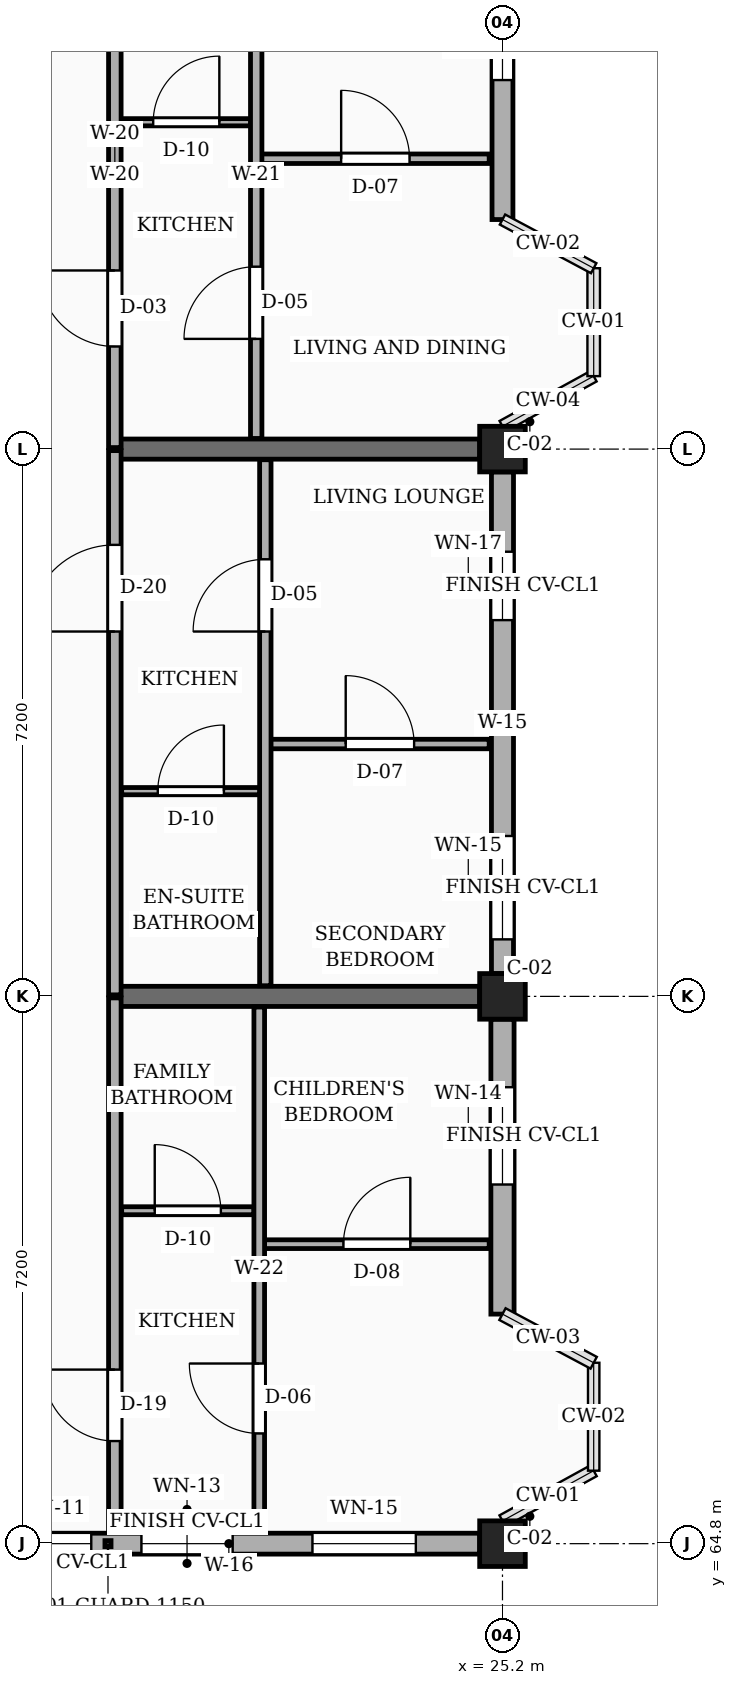
"""IFC4 building model, lengths in metres.
Left out: names, types, materials, properties, quantities, classifications, styles, units other than length and angle.
Written with IfcOpenShell. Run it as: python <this file> out.ifc"""

import sys

from ifc_helpers import new_model, si_unit, direction, frame, frame_2d, origin, origin_2d, place, context, subcontext, project, spatial, rectangle, extrude, element, fill, save


model = new_model("IFC4")
c1 = context("Model", 3, precision=1e-05, world=origin(), true_north=direction((0.0, 1.0)))
c2 = subcontext(c1, "Body", "Model", "MODEL_VIEW")
j1 = project(units=[si_unit("LENGTHUNIT", "METRE"), si_unit("PLANEANGLEUNIT", "RADIAN")], contexts=[c1])
p1 = place(None, origin())
s1 = spatial("IfcSite", under=j1, at=p1, CompositionType="ELEMENT")
p2 = place(p1, origin())
s2 = spatial("IfcBuilding", under=s1, at=p2, CompositionType="ELEMENT")
p3 = place(p2, frame((0.0, 0.0, 7.65)))
s3 = spatial("IfcBuildingStorey", under=s2, at=p3, CompositionType="ELEMENT", Elevation=7.65)
for number, where, z_axis, x_axis in (
    (1, (25.2, 64.8, 0.0), (0.0, 0.0, 1.0), (1.0, 0.0, 0.0)),
    (2, (25.2, 72.0, 0.0), (0.0, 0.0, 1.0), (1.0, 0.0, 0.0)),
    (3, (25.2, 79.2, 0.0), (0.0, 0.0, 1.0), (1.0, 0.0, 0.0)),
):
    element("IfcColumn", number, at=place(p3, frame(where, z_axis=z_axis, x_axis=x_axis)), inside=s3, PredefinedType="COLUMN", context=c2, shape_type="SweptSolid", body=[
        extrude(rectangle(XDim=0.6, YDim=0.6, at=origin_2d()), origin(), (0.0, 0.0, 1.0), 3.15),
    ])
for number, where, z_axis, x_axis in (
    (4, (20.1, 72.0, 0.0), (0.0, 0.0, 1.0), (1.0, 0.0, 0.0)),
    (5, (20.1, 79.2, 0.0), (0.0, 0.0, 1.0), (1.0, 0.0, 0.0)),
):
    element("IfcWall", number, at=place(p3, frame(where, z_axis=z_axis, x_axis=x_axis)), inside=s3, PredefinedType="SOLIDWALL", context=c2, shape_type="SweptSolid", body=[
        extrude(rectangle(XDim=4.8, YDim=0.265, at=frame_2d((2.4, 0.0))), origin(), (0.0, 0.0, 1.0), 2.21),
    ])
p4 = place(p3, frame((18.3, 64.8, 0.0), z_axis=(0.0, 0.0, 1.0), x_axis=(1.0, 0.0, 0.0)))
e6 = element("IfcWall", 6, at=p4, inside=s3, PredefinedType="SOLIDWALL", context=c2, shape_type="SweptSolid", body=[
    extrude(rectangle(XDim=6.6, YDim=0.275, at=frame_2d((3.3, 0.0))), origin(), (0.0, 0.0, 1.0), 2.48),
])
p5 = place(p4, frame((0.45, 0.0, 0.78)))
e7 = element("IfcOpeningElement", 7, at=p5, cuts=e6, PredefinedType="OPENING", context=c2, shape_type="SweptSolid", body=[
    extrude(rectangle(XDim=1.04, YDim=1.26, at=frame_2d((0.52, 0.63))), frame((0.0, 0.147, 0.0), z_axis=(0.0, -1.0, 0.0), x_axis=(1.0, 0.0, 0.0)), (0.0, 0.0, 1.0), 0.295),
])
p6 = place(p4, frame((2.15, 0.0, 0.78)))
e8 = element("IfcOpeningElement", 8, at=p6, cuts=e6, PredefinedType="OPENING", context=c2, shape_type="SweptSolid", body=[
    extrude(rectangle(XDim=1.2, YDim=1.26, at=frame_2d((0.6, 0.63))), frame((0.0, 0.147, 0.0), z_axis=(0.0, -1.0, 0.0), x_axis=(1.0, 0.0, 0.0)), (0.0, 0.0, 1.0), 0.295),
])
p7 = place(p4, frame((4.4, 0.0, 0.78)))
e9 = element("IfcOpeningElement", 9, at=p7, cuts=e6, PredefinedType="OPENING", context=c2, shape_type="SweptSolid", body=[
    extrude(rectangle(XDim=1.36, YDim=1.26, at=frame_2d((0.68, 0.63))), frame((0.0, 0.147, 0.0), z_axis=(0.0, -1.0, 0.0), x_axis=(1.0, 0.0, 0.0)), (0.0, 0.0, 1.0), 0.295),
])
p8 = place(p3, frame((25.2, 67.82, 0.0), z_axis=(0.0, 0.0, 1.0), x_axis=(0.0, 1.0, 0.0)))
e10 = element("IfcWall", 10, at=p8, inside=s3, PredefinedType="SOLIDWALL", context=c2, shape_type="SweptSolid", body=[
    extrude(rectangle(XDim=3.88, YDim=0.305, at=frame_2d((1.94, 0.0))), origin(), (0.0, 0.0, 1.0), 2.48),
])
p9 = place(p8, frame((1.705, 0.0, 0.78)))
e11 = element("IfcOpeningElement", 11, at=p9, cuts=e10, PredefinedType="OPENING", context=c2, shape_type="SweptSolid", body=[
    extrude(rectangle(XDim=1.28, YDim=1.26, at=frame_2d((0.64, 0.63))), frame((0.0, 0.163, 0.0), z_axis=(0.0, -1.0, 0.0), x_axis=(1.0, 0.0, 0.0)), (0.0, 0.0, 1.0), 0.325),
])
p10 = place(p3, frame((25.2, 72.3, 0.0), z_axis=(0.0, 0.0, 1.0), x_axis=(0.0, 1.0, 0.0)))
e12 = element("IfcWall", 12, at=p10, inside=s3, PredefinedType="SOLIDWALL", context=c2, shape_type="SweptSolid", body=[
    extrude(rectangle(XDim=6.6, YDim=0.29, at=frame_2d((3.3, 0.0))), origin(), (0.0, 0.0, 1.0), 2.48),
])
p11 = place(p10, frame((0.45, 0.0, 0.78)))
e13 = element("IfcOpeningElement", 13, at=p11, cuts=e12, PredefinedType="OPENING", context=c2, shape_type="SweptSolid", body=[
    extrude(rectangle(XDim=1.36, YDim=1.26, at=frame_2d((0.68, 0.63))), frame((0.0, 0.155, 0.0), z_axis=(0.0, -1.0, 0.0), x_axis=(1.0, 0.0, 0.0)), (0.0, 0.0, 1.0), 0.31),
])
p12 = place(p10, frame((4.65, 0.0, 0.78)))
e14 = element("IfcOpeningElement", 14, at=p12, cuts=e12, PredefinedType="OPENING", context=c2, shape_type="SweptSolid", body=[
    extrude(rectangle(XDim=0.9, YDim=1.36, at=frame_2d((0.45, 0.68))), frame((0.0, 0.155, 0.0), z_axis=(0.0, -1.0, 0.0), x_axis=(1.0, 0.0, 0.0)), (0.0, 0.0, 1.0), 0.31),
])
p13 = place(p3, frame((25.2, 82.22, 0.0), z_axis=(0.0, 0.0, 1.0), x_axis=(0.0, 1.0, 0.0)))
e15 = element("IfcWall", 15, at=p13, inside=s3, PredefinedType="SOLIDWALL", context=c2, shape_type="SweptSolid", body=[
    extrude(rectangle(XDim=3.88, YDim=0.275, at=frame_2d((1.94, 0.0))), origin(), (0.0, 0.0, 1.0), 2.48),
])
p14 = place(p13, frame((1.835, 0.0, 0.78)))
e16 = element("IfcOpeningElement", 16, at=p14, cuts=e15, PredefinedType="OPENING", context=c2, shape_type="SweptSolid", body=[
    extrude(rectangle(XDim=0.9, YDim=1.36, at=frame_2d((0.45, 0.68))), frame((0.0, 0.147, 0.0), z_axis=(0.0, -1.0, 0.0), x_axis=(1.0, 0.0, 0.0)), (0.0, 0.0, 1.0), 0.295),
])
p15 = place(p3, frame((20.1, 64.975, 0.0), z_axis=(0.0, 0.0, 1.0), x_axis=(0.0, 1.0, 0.0)))
e17 = element("IfcWall", 17, at=p15, inside=s3, PredefinedType="PARTITIONING", context=c2, shape_type="SweptSolid", body=[
    extrude(rectangle(XDim=7.005, YDim=0.165, at=frame_2d((3.502, 0.0))), origin(), (0.0, 0.0, 1.0), 2.345),
])
p16 = place(p15, frame((1.175, 0.0, 0.0)))
e18 = element("IfcOpeningElement", 18, at=p16, cuts=e17, PredefinedType="OPENING", context=c2, shape_type="SweptSolid", body=[
    extrude(rectangle(XDim=0.94, YDim=2.12, at=frame_2d((0.47, 1.06))), frame((0.0, 0.093, 0.0), z_axis=(0.0, -1.0, 0.0), x_axis=(1.0, 0.0, 0.0)), (0.0, 0.0, 1.0), 0.185),
])
p17 = place(p3, frame((20.1, 72.02, 0.0), z_axis=(0.0, 0.0, 1.0), x_axis=(0.0, 1.0, 0.0)))
e19 = element("IfcWall", 19, at=p17, inside=s3, PredefinedType="PARTITIONING", context=c2, shape_type="SweptSolid", body=[
    extrude(rectangle(XDim=7.16, YDim=0.165, at=frame_2d((3.58, 0.0))), origin(), (0.0, 0.0, 1.0), 2.345),
])
p18 = place(p17, frame((4.78, 0.0, 0.0)))
e20 = element("IfcOpeningElement", 20, at=p18, cuts=e19, PredefinedType="OPENING", context=c2, shape_type="SweptSolid", body=[
    extrude(rectangle(XDim=1.14, YDim=2.18, at=frame_2d((0.57, 1.09))), frame((0.0, 0.093, 0.0), z_axis=(0.0, -1.0, 0.0), x_axis=(1.0, 0.0, 0.0)), (0.0, 0.0, 1.0), 0.185),
])
p19 = place(p3, frame((20.1, 79.22, 0.0), z_axis=(0.0, 0.0, 1.0), x_axis=(0.0, 1.0, 0.0)))
e21 = element("IfcWall", 21, at=p19, inside=s3, PredefinedType="PARTITIONING", context=c2, shape_type="SweptSolid", body=[
    extrude(rectangle(XDim=7.16, YDim=0.165, at=frame_2d((3.58, 0.0))), origin(), (0.0, 0.0, 1.0), 2.345),
])
p20 = place(p19, frame((1.33, 0.0, 0.0)))
e22 = element("IfcOpeningElement", 22, at=p20, cuts=e21, PredefinedType="OPENING", context=c2, shape_type="SweptSolid", body=[
    extrude(rectangle(XDim=1.0, YDim=2.15, at=frame_2d((0.5, 1.075))), frame((0.0, 0.093, 0.0), z_axis=(0.0, -1.0, 0.0), x_axis=(1.0, 0.0, 0.0)), (0.0, 0.0, 1.0), 0.185),
])
p21 = place(p3, frame((22.07, 68.74, 0.0), z_axis=(0.0, 0.0, 1.0), x_axis=(1.0, 0.0, 0.0)))
e23 = element("IfcWall", 23, at=p21, inside=s3, PredefinedType="PARTITIONING", context=c2, shape_type="SweptSolid", body=[
    extrude(rectangle(XDim=2.955, YDim=0.115, at=frame_2d((1.478, 0.0))), origin(), (0.0, 0.0, 1.0), 2.345),
])
p22 = place(p21, frame((1.038, 0.0, 0.0)))
e24 = element("IfcOpeningElement", 24, at=p22, cuts=e23, PredefinedType="OPENING", context=c2, shape_type="SweptSolid", body=[
    extrude(rectangle(XDim=0.88, YDim=2.08, at=frame_2d((0.44, 1.04))), frame((0.0, 0.067, 0.0), z_axis=(0.0, -1.0, 0.0), x_axis=(1.0, 0.0, 0.0)), (0.0, 0.0, 1.0), 0.135),
])
p23 = place(p3, frame((20.19, 69.18, 0.0), z_axis=(0.0, 0.0, 1.0), x_axis=(1.0, 0.0, 0.0)))
e25 = element("IfcWall", 25, at=p23, inside=s3, PredefinedType="PARTITIONING", context=c2, shape_type="SweptSolid", body=[
    extrude(rectangle(XDim=1.74, YDim=0.105, at=frame_2d((0.87, 0.0))), origin(), (0.0, 0.0, 1.0), 2.345),
])
p24 = place(p23, frame((0.435, 0.0, 0.0)))
e26 = element("IfcOpeningElement", 26, at=p24, cuts=e25, PredefinedType="OPENING", context=c2, shape_type="SweptSolid", body=[
    extrude(rectangle(XDim=0.87, YDim=2.05, at=frame_2d((0.435, 1.025))), frame((0.0, 0.062, 0.0), z_axis=(0.0, -1.0, 0.0), x_axis=(1.0, 0.0, 0.0)), (0.0, 0.0, 1.0), 0.125),
])
p25 = place(p3, frame((22.0, 64.975, 0.0), z_axis=(0.0, 0.0, 1.0), x_axis=(0.0, 1.0, 0.0)))
e27 = element("IfcWall", 27, at=p25, inside=s3, PredefinedType="PARTITIONING", context=c2, shape_type="SweptSolid", body=[
    extrude(rectangle(XDim=6.885, YDim=0.14, at=frame_2d((3.442, 0.0))), origin(), (0.0, 0.0, 1.0), 2.345),
])
p26 = place(p25, frame((1.275, 0.0, 0.0)))
e28 = element("IfcOpeningElement", 28, at=p26, cuts=e27, PredefinedType="OPENING", context=c2, shape_type="SweptSolid", body=[
    extrude(rectangle(XDim=0.92, YDim=2.1, at=frame_2d((0.46, 1.05))), frame((0.0, 0.08, 0.0), z_axis=(0.0, -1.0, 0.0), x_axis=(1.0, 0.0, 0.0)), (0.0, 0.0, 1.0), 0.16),
])
p27 = place(p3, frame((22.15, 75.32, 0.0), z_axis=(0.0, 0.0, 1.0), x_axis=(1.0, 0.0, 0.0)))
e29 = element("IfcWall", 29, at=p27, inside=s3, PredefinedType="PARTITIONING", context=c2, shape_type="SweptSolid", body=[
    extrude(rectangle(XDim=2.875, YDim=0.125, at=frame_2d((1.438, 0.0))), origin(), (0.0, 0.0, 1.0), 2.345),
])
p28 = place(p27, frame((0.988, 0.0, 0.0)))
e30 = element("IfcOpeningElement", 30, at=p28, cuts=e29, PredefinedType="OPENING", context=c2, shape_type="SweptSolid", body=[
    extrude(rectangle(XDim=0.9, YDim=2.1, at=frame_2d((0.45, 1.05))), frame((0.0, 0.073, 0.0), z_axis=(0.0, -1.0, 0.0), x_axis=(1.0, 0.0, 0.0)), (0.0, 0.0, 1.0), 0.145),
])
p29 = place(p3, frame((20.19, 74.7, 0.0), z_axis=(0.0, 0.0, 1.0), x_axis=(1.0, 0.0, 0.0)))
e31 = element("IfcWall", 31, at=p29, inside=s3, PredefinedType="PARTITIONING", context=c2, shape_type="SweptSolid", body=[
    extrude(rectangle(XDim=1.82, YDim=0.095, at=frame_2d((0.91, 0.0))), origin(), (0.0, 0.0, 1.0), 2.345),
])
p30 = place(p29, frame((0.475, 0.0, 0.0)))
e32 = element("IfcOpeningElement", 32, at=p30, cuts=e31, PredefinedType="OPENING", context=c2, shape_type="SweptSolid", body=[
    extrude(rectangle(XDim=0.87, YDim=2.05, at=frame_2d((0.435, 1.025))), frame((0.0, 0.058, 0.0), z_axis=(0.0, -1.0, 0.0), x_axis=(1.0, 0.0, 0.0)), (0.0, 0.0, 1.0), 0.115),
])
p31 = place(p3, frame((22.08, 72.14, 0.0), z_axis=(0.0, 0.0, 1.0), x_axis=(0.0, 1.0, 0.0)))
e33 = element("IfcWall", 33, at=p31, inside=s3, PredefinedType="PARTITIONING", context=c2, shape_type="SweptSolid", body=[
    extrude(rectangle(XDim=6.92, YDim=0.15, at=frame_2d((3.46, 0.0))), origin(), (0.0, 0.0, 1.0), 2.345),
])
p32 = place(p31, frame((4.66, 0.0, 0.0)))
e34 = element("IfcOpeningElement", 34, at=p32, cuts=e33, PredefinedType="OPENING", context=c2, shape_type="SweptSolid", body=[
    extrude(rectangle(XDim=0.95, YDim=2.1, at=frame_2d((0.475, 1.05))), frame((0.0, 0.085, 0.0), z_axis=(0.0, -1.0, 0.0), x_axis=(1.0, 0.0, 0.0)), (0.0, 0.0, 1.0), 0.17),
])
p33 = place(p3, frame((22.03, 83.02, 0.0), z_axis=(0.0, 0.0, 1.0), x_axis=(1.0, 0.0, 0.0)))
e35 = element("IfcWall", 35, at=p33, inside=s3, PredefinedType="PARTITIONING", context=c2, shape_type="SweptSolid", body=[
    extrude(rectangle(XDim=2.995, YDim=0.125, at=frame_2d((1.498, 0.0))), origin(), (0.0, 0.0, 1.0), 2.345),
])
p34 = place(p33, frame((1.048, 0.0, 0.0)))
e36 = element("IfcOpeningElement", 36, at=p34, cuts=e35, PredefinedType="OPENING", context=c2, shape_type="SweptSolid", body=[
    extrude(rectangle(XDim=0.9, YDim=2.1, at=frame_2d((0.45, 1.05))), frame((0.0, 0.073, 0.0), z_axis=(0.0, -1.0, 0.0), x_axis=(1.0, 0.0, 0.0)), (0.0, 0.0, 1.0), 0.145),
])
p35 = place(p3, frame((20.19, 83.5, 0.0), z_axis=(0.0, 0.0, 1.0), x_axis=(1.0, 0.0, 0.0)))
e37 = element("IfcWall", 37, at=p35, inside=s3, PredefinedType="PARTITIONING", context=c2, shape_type="SweptSolid", body=[
    extrude(rectangle(XDim=1.7, YDim=0.095, at=frame_2d((0.85, 0.0))), origin(), (0.0, 0.0, 1.0), 2.345),
])
p36 = place(p35, frame((0.415, 0.0, 0.0)))
e38 = element("IfcOpeningElement", 38, at=p36, cuts=e37, PredefinedType="OPENING", context=c2, shape_type="SweptSolid", body=[
    extrude(rectangle(XDim=0.87, YDim=2.05, at=frame_2d((0.435, 1.025))), frame((0.0, 0.058, 0.0), z_axis=(0.0, -1.0, 0.0), x_axis=(1.0, 0.0, 0.0)), (0.0, 0.0, 1.0), 0.115),
])
p37 = place(p3, frame((21.96, 79.34, 0.0), z_axis=(0.0, 0.0, 1.0), x_axis=(0.0, 1.0, 0.0)))
e39 = element("IfcWall", 39, at=p37, inside=s3, PredefinedType="PARTITIONING", context=c2, shape_type="SweptSolid", body=[
    extrude(rectangle(XDim=6.92, YDim=0.15, at=frame_2d((3.46, 0.0))), origin(), (0.0, 0.0, 1.0), 2.345),
])
p38 = place(p37, frame((1.31, 0.0, 0.0)))
e40 = element("IfcOpeningElement", 40, at=p38, cuts=e39, PredefinedType="OPENING", context=c2, shape_type="SweptSolid", body=[
    extrude(rectangle(XDim=0.95, YDim=2.1, at=frame_2d((0.475, 1.05))), frame((0.0, 0.085, 0.0), z_axis=(0.0, -1.0, 0.0), x_axis=(1.0, 0.0, 0.0)), (0.0, 0.0, 1.0), 0.17),
])
p39 = place(p5, origin())
e41 = element("IfcWindow", 41, at=p39, inside=s3, PartitioningType="SINGLE_PANEL", PredefinedType="WINDOW", context=c2, shape_type="SweptSolid", body=[
    extrude(rectangle(XDim=1.04, YDim=1.26, at=frame_2d((0.52, 0.63))), frame((0.0, 0.03, 0.0), z_axis=(0.0, -1.0, 0.0), x_axis=(1.0, 0.0, 0.0)), (0.0, 0.0, 1.0), 0.06),
])
fill(e7, e41)
p40 = place(p6, origin())
e42 = element("IfcWindow", 42, at=p40, inside=s3, PartitioningType="SINGLE_PANEL", PredefinedType="WINDOW", context=c2, shape_type="SweptSolid", body=[
    extrude(rectangle(XDim=1.2, YDim=1.26, at=frame_2d((0.6, 0.63))), frame((0.0, 0.03, 0.0), z_axis=(0.0, -1.0, 0.0), x_axis=(1.0, 0.0, 0.0)), (0.0, 0.0, 1.0), 0.06),
])
fill(e8, e42)
p41 = place(p7, origin())
e43 = element("IfcWindow", 43, at=p41, inside=s3, PartitioningType="SINGLE_PANEL", PredefinedType="WINDOW", context=c2, shape_type="SweptSolid", body=[
    extrude(rectangle(XDim=1.36, YDim=1.26, at=frame_2d((0.68, 0.63))), frame((0.0, 0.03, 0.0), z_axis=(0.0, -1.0, 0.0), x_axis=(1.0, 0.0, 0.0)), (0.0, 0.0, 1.0), 0.06),
])
fill(e9, e43)
p42 = place(p9, origin())
e44 = element("IfcWindow", 44, at=p42, inside=s3, PartitioningType="SINGLE_PANEL", PredefinedType="WINDOW", context=c2, shape_type="SweptSolid", body=[
    extrude(rectangle(XDim=1.28, YDim=1.26, at=frame_2d((0.64, 0.63))), frame((0.0, 0.03, 0.0), z_axis=(0.0, -1.0, 0.0), x_axis=(1.0, 0.0, 0.0)), (0.0, 0.0, 1.0), 0.06),
])
fill(e11, e44)
p43 = place(p11, origin())
e45 = element("IfcWindow", 45, at=p43, inside=s3, PartitioningType="SINGLE_PANEL", PredefinedType="WINDOW", context=c2, shape_type="SweptSolid", body=[
    extrude(rectangle(XDim=1.36, YDim=1.26, at=frame_2d((0.68, 0.63))), frame((0.0, 0.03, 0.0), z_axis=(0.0, -1.0, 0.0), x_axis=(1.0, 0.0, 0.0)), (0.0, 0.0, 1.0), 0.06),
])
fill(e13, e45)
p44 = place(p12, origin())
e46 = element("IfcWindow", 46, at=p44, inside=s3, PartitioningType="SINGLE_PANEL", PredefinedType="WINDOW", context=c2, shape_type="SweptSolid", body=[
    extrude(rectangle(XDim=0.9, YDim=1.36, at=frame_2d((0.45, 0.68))), frame((0.0, 0.03, 0.0), z_axis=(0.0, -1.0, 0.0), x_axis=(1.0, 0.0, 0.0)), (0.0, 0.0, 1.0), 0.06),
])
fill(e14, e46)
p45 = place(p14, origin())
e47 = element("IfcWindow", 47, at=p45, inside=s3, PartitioningType="SINGLE_PANEL", PredefinedType="WINDOW", context=c2, shape_type="SweptSolid", body=[
    extrude(rectangle(XDim=0.9, YDim=1.36, at=frame_2d((0.45, 0.68))), frame((0.0, 0.03, 0.0), z_axis=(0.0, -1.0, 0.0), x_axis=(1.0, 0.0, 0.0)), (0.0, 0.0, 1.0), 0.06),
])
fill(e16, e47)
p46 = place(p16, origin())
e48 = element("IfcDoor", 48, at=p46, inside=s3, OperationType="SINGLE_SWING_RIGHT", PredefinedType="DOOR", context=c2, shape_type="SweptSolid", body=[
    extrude(rectangle(XDim=0.94, YDim=2.12, at=frame_2d((0.47, 1.06))), frame((0.0, 0.025, 0.0), z_axis=(0.0, -1.0, 0.0), x_axis=(1.0, 0.0, 0.0)), (0.0, 0.0, 1.0), 0.05),
])
fill(e18, e48)
p47 = place(p18, origin())
e49 = element("IfcDoor", 49, at=p47, inside=s3, OperationType="SINGLE_SWING_LEFT", PredefinedType="DOOR", context=c2, shape_type="SweptSolid", body=[
    extrude(rectangle(XDim=1.14, YDim=2.18, at=frame_2d((0.57, 1.09))), frame((0.0, 0.025, 0.0), z_axis=(0.0, -1.0, 0.0), x_axis=(1.0, 0.0, 0.0)), (0.0, 0.0, 1.0), 0.05),
])
fill(e20, e49)
p48 = place(p20, origin())
e50 = element("IfcDoor", 50, at=p48, inside=s3, OperationType="SINGLE_SWING_RIGHT", PredefinedType="DOOR", context=c2, shape_type="SweptSolid", body=[
    extrude(rectangle(XDim=1.0, YDim=2.15, at=frame_2d((0.5, 1.075))), frame((0.0, 0.025, 0.0), z_axis=(0.0, -1.0, 0.0), x_axis=(1.0, 0.0, 0.0)), (0.0, 0.0, 1.0), 0.05),
])
fill(e22, e50)
p49 = place(p22, origin())
e51 = element("IfcDoor", 51, at=p49, inside=s3, OperationType="SINGLE_SWING_RIGHT", PredefinedType="DOOR", context=c2, shape_type="SweptSolid", body=[
    extrude(rectangle(XDim=0.88, YDim=2.08, at=frame_2d((0.44, 1.04))), frame((0.0, 0.025, 0.0), z_axis=(0.0, -1.0, 0.0), x_axis=(1.0, 0.0, 0.0)), (0.0, 0.0, 1.0), 0.05),
])
fill(e24, e51)
p50 = place(p24, origin())
e52 = element("IfcDoor", 52, at=p50, inside=s3, OperationType="SINGLE_SWING_LEFT", PredefinedType="DOOR", context=c2, shape_type="SweptSolid", body=[
    extrude(rectangle(XDim=0.87, YDim=2.05, at=frame_2d((0.435, 1.025))), frame((0.0, 0.025, 0.0), z_axis=(0.0, -1.0, 0.0), x_axis=(1.0, 0.0, 0.0)), (0.0, 0.0, 1.0), 0.05),
])
fill(e26, e52)
p51 = place(p26, origin())
e53 = element("IfcDoor", 53, at=p51, inside=s3, OperationType="SINGLE_SWING_RIGHT", PredefinedType="DOOR", context=c2, shape_type="SweptSolid", body=[
    extrude(rectangle(XDim=0.92, YDim=2.1, at=frame_2d((0.46, 1.05))), frame((0.0, 0.025, 0.0), z_axis=(0.0, -1.0, 0.0), x_axis=(1.0, 0.0, 0.0)), (0.0, 0.0, 1.0), 0.05),
])
fill(e28, e53)
p52 = place(p28, origin())
e54 = element("IfcDoor", 54, at=p52, inside=s3, OperationType="SINGLE_SWING_LEFT", PredefinedType="DOOR", context=c2, shape_type="SweptSolid", body=[
    extrude(rectangle(XDim=0.9, YDim=2.1, at=frame_2d((0.45, 1.05))), frame((0.0, 0.025, 0.0), z_axis=(0.0, -1.0, 0.0), x_axis=(1.0, 0.0, 0.0)), (0.0, 0.0, 1.0), 0.05),
])
fill(e30, e54)
p53 = place(p30, origin())
e55 = element("IfcDoor", 55, at=p53, inside=s3, OperationType="SINGLE_SWING_RIGHT", PredefinedType="DOOR", context=c2, shape_type="SweptSolid", body=[
    extrude(rectangle(XDim=0.87, YDim=2.05, at=frame_2d((0.435, 1.025))), frame((0.0, 0.025, 0.0), z_axis=(0.0, -1.0, 0.0), x_axis=(1.0, 0.0, 0.0)), (0.0, 0.0, 1.0), 0.05),
])
fill(e32, e55)
p54 = place(p32, origin())
e56 = element("IfcDoor", 56, at=p54, inside=s3, OperationType="SINGLE_SWING_LEFT", PredefinedType="DOOR", context=c2, shape_type="SweptSolid", body=[
    extrude(rectangle(XDim=0.95, YDim=2.1, at=frame_2d((0.475, 1.05))), frame((0.0, 0.025, 0.0), z_axis=(0.0, -1.0, 0.0), x_axis=(1.0, 0.0, 0.0)), (0.0, 0.0, 1.0), 0.05),
])
fill(e34, e56)
p55 = place(p34, origin())
e57 = element("IfcDoor", 57, at=p55, inside=s3, OperationType="SINGLE_SWING_LEFT", PredefinedType="DOOR", context=c2, shape_type="SweptSolid", body=[
    extrude(rectangle(XDim=0.9, YDim=2.1, at=frame_2d((0.45, 1.05))), frame((0.0, 0.025, 0.0), z_axis=(0.0, -1.0, 0.0), x_axis=(1.0, 0.0, 0.0)), (0.0, 0.0, 1.0), 0.05),
])
fill(e36, e57)
p56 = place(p36, origin())
e58 = element("IfcDoor", 58, at=p56, inside=s3, OperationType="SINGLE_SWING_RIGHT", PredefinedType="DOOR", context=c2, shape_type="SweptSolid", body=[
    extrude(rectangle(XDim=0.87, YDim=2.05, at=frame_2d((0.435, 1.025))), frame((0.0, 0.025, 0.0), z_axis=(0.0, -1.0, 0.0), x_axis=(1.0, 0.0, 0.0)), (0.0, 0.0, 1.0), 0.05),
])
fill(e38, e58)
p57 = place(p38, origin())
e59 = element("IfcDoor", 59, at=p57, inside=s3, OperationType="SINGLE_SWING_LEFT", PredefinedType="DOOR", context=c2, shape_type="SweptSolid", body=[
    extrude(rectangle(XDim=0.95, YDim=2.1, at=frame_2d((0.475, 1.05))), frame((0.0, 0.025, 0.0), z_axis=(0.0, -1.0, 0.0), x_axis=(1.0, 0.0, 0.0)), (0.0, 0.0, 1.0), 0.05),
])
fill(e40, e59)
save(model, sys.argv[1])
